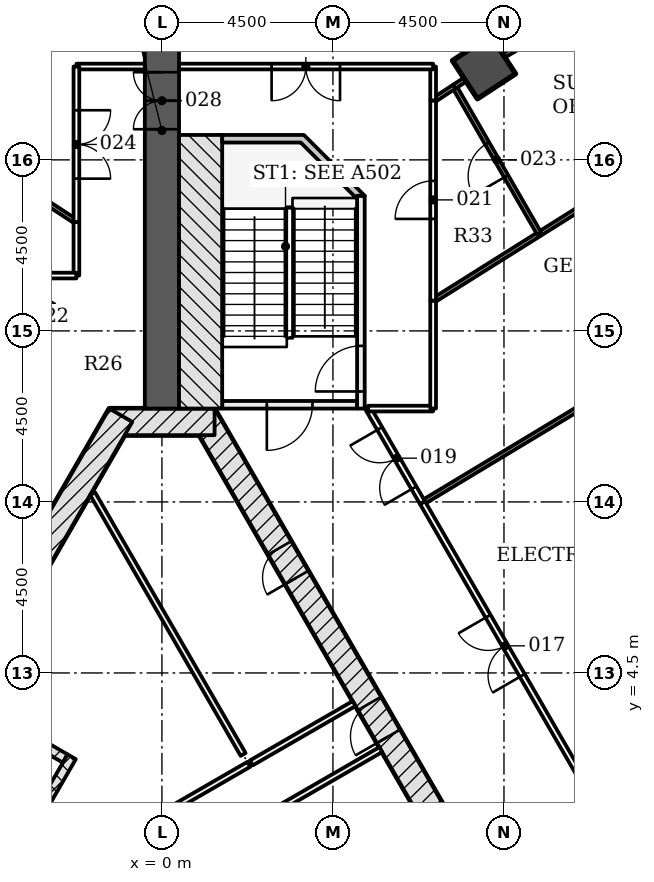
"""IFC4 building model, lengths in metres.
Left out: names, types, materials, properties, quantities, classifications, styles, units other than length and angle.
Written with IfcOpenShell. Run it as: python <this file> out.ifc"""

import sys

from ifc_helpers import new_model, si_unit, direction, frame, frame_2d, origin, origin_2d, place, context, subcontext, project, spatial, polyline, rectangle, outline, extrude, element, fill, save


model = new_model("IFC4")
c1 = context("Model", 3, precision=1e-05, world=origin(), true_north=direction((0.0, 1.0)))
c2 = subcontext(c1, "Body", "Model", "MODEL_VIEW")
j1 = project(units=[si_unit("LENGTHUNIT", "METRE"), si_unit("PLANEANGLEUNIT", "RADIAN")], contexts=[c1])
p1 = place(None, origin())
s1 = spatial("IfcSite", under=j1, at=p1, CompositionType="ELEMENT")
p2 = place(p1, origin())
s2 = spatial("IfcBuilding", under=s1, at=p2, CompositionType="ELEMENT")
p3 = place(p2, frame((0.0, 0.0, -9.0)))
s3 = spatial("IfcBuildingStorey", under=s2, at=p3, CompositionType="ELEMENT", Elevation=-9.0)
p4 = place(p3, frame((8.475, 20.438, -0.3), z_axis=(0.0, 0.0, 1.0), x_axis=(0.836867705394, 0.547405191489, 0.0)))
e1 = element("IfcColumn", 1, at=p4, inside=s3, PredefinedType="COLUMN", context=c2, shape_type="SweptSolid", body=[
    extrude(rectangle(XDim=1.2, YDim=1.2, at=origin_2d()), origin(), (0.0, 0.0, 1.0), 4.5),
])
p5 = place(p3, frame((10.311, -4.703, -0.3), z_axis=(0.0, 0.0, 1.0), x_axis=(-0.500001446645, 0.866024568562, 0.0)))
e2 = element("IfcWall", 2, at=p5, inside=s3, PredefinedType="SHEAR", context=c2, shape_type="SweptSolid", body=[
    extrude(rectangle(XDim=18.458, YDim=0.7, at=frame_2d((9.229, 0.0))), origin(), (0.0, 0.0, 1.0), 4.5),
])
p6 = place(p5, frame((8.7, 0.0, 0.3)))
e3 = element("IfcOpeningElement", 3, at=p6, cuts=e2, PredefinedType="OPENING", context=c2, shape_type="SweptSolid", body=[
    extrude(rectangle(XDim=1.0, YDim=2.1, at=frame_2d((0.5, 1.05))), frame((0.0, 0.36, 0.0), z_axis=(0.0, -1.0, 0.0), x_axis=(1.0, 0.0, 0.0)), (0.0, 0.0, 1.0), 0.72),
])
p7 = place(p5, frame((4.002, 0.0, 0.3)))
e4 = element("IfcOpeningElement", 4, at=p7, cuts=e2, PredefinedType="OPENING", context=c2, shape_type="SweptSolid", body=[
    extrude(rectangle(XDim=0.9, YDim=2.1, at=frame_2d((0.45, 1.05))), frame((0.0, 0.36, 0.0), z_axis=(0.0, -1.0, 0.0), x_axis=(1.0, 0.0, 0.0)), (0.0, 0.0, 1.0), 0.72),
])
p8 = place(p5, frame((13.527, 0.0, 0.3)))
e5 = element("IfcOpeningElement", 5, at=p8, cuts=e2, PredefinedType="OPENING", context=c2, shape_type="SweptSolid", body=[
    extrude(rectangle(XDim=0.9, YDim=2.1, at=frame_2d((0.45, 1.05))), frame((0.0, 0.36, 0.0), z_axis=(0.0, -1.0, 0.0), x_axis=(1.0, 0.0, 0.0)), (0.0, 0.0, 1.0), 0.72),
])
p9 = place(p3, frame((1.386, 11.106, -0.3), z_axis=(0.0, 0.0, 1.0), x_axis=(-1.0, 0.0, 0.0)))
e6 = element("IfcWall", 6, at=p9, inside=s3, PredefinedType="SHEAR", context=c2, shape_type="SweptSolid", body=[
    extrude(rectangle(XDim=2.771, YDim=0.7, at=frame_2d((1.386, 0.0))), origin(), (0.0, 0.0, 1.0), 4.5),
])
p10 = place(p3, frame((-1.083, 11.281, -0.3), z_axis=(0.0, 0.0, 1.0), x_axis=(-0.500001446645, -0.866024568562, 0.0)))
e7 = element("IfcWall", 7, at=p10, inside=s3, PredefinedType="SHEAR", context=c2, shape_type="SweptSolid", body=[
    extrude(rectangle(XDim=18.458, YDim=0.7, at=frame_2d((9.229, 0.0))), origin(), (0.0, 0.0, 1.0), 4.5),
])
p11 = place(p10, frame((8.979, 0.0, 0.3)))
e8 = element("IfcOpeningElement", 8, at=p11, cuts=e7, PredefinedType="OPENING", context=c2, shape_type="SweptSolid", body=[
    extrude(rectangle(XDim=1.2, YDim=2.1, at=frame_2d((0.6, 1.05))), frame((0.0, 0.36, 0.0), z_axis=(0.0, -1.0, 0.0), x_axis=(1.0, 0.0, 0.0)), (0.0, 0.0, 1.0), 0.72),
])
p12 = place(p10, frame((11.029, 0.0, 0.3)))
e9 = element("IfcOpeningElement", 9, at=p12, cuts=e7, PredefinedType="OPENING", context=c2, shape_type="SweptSolid", body=[
    extrude(rectangle(XDim=1.2, YDim=2.1, at=frame_2d((0.6, 1.05))), frame((0.0, 0.36, 0.0), z_axis=(0.0, -1.0, 0.0), x_axis=(1.0, 0.0, 0.0)), (0.0, 0.0, 1.0), 0.72),
])
p13 = place(p3, frame((0.0, 11.456, -0.3), z_axis=(0.0, 0.0, 1.0), x_axis=(0.0, 1.0, 0.0)))
e10 = element("IfcWall", 10, at=p13, inside=s3, PredefinedType="SHEAR", context=c2, shape_type="SweptSolid", body=[
    extrude(rectangle(XDim=14.633, YDim=0.9, at=frame_2d((7.316, 0.0))), origin(), (0.0, 0.0, 1.0), 4.5),
])
p14 = place(p13, frame((7.35, 0.0, 0.3)))
e11 = element("IfcOpeningElement", 11, at=p14, cuts=e10, PredefinedType="OPENING", context=c2, shape_type="SweptSolid", body=[
    extrude(rectangle(XDim=1.5, YDim=2.1, at=frame_2d((0.75, 1.05))), frame((0.0, 0.46, 0.0), z_axis=(0.0, -1.0, 0.0), x_axis=(1.0, 0.0, 0.0)), (0.0, 0.0, 1.0), 0.92),
])
p15 = place(p3, frame((-5.056, 3.699, 0.0), z_axis=(0.0, 0.0, 1.0), x_axis=(0.866032775405, -0.499987231761, 0.0)))
e12 = element("IfcWall", 12, at=p15, inside=s3, PredefinedType="PARTITIONING", context=c2, shape_type="SweptSolid", body=[
    extrude(rectangle(XDim=2.9, YDim=0.25, at=frame_2d((1.45, 0.0))), origin(), (0.0, 0.0, 1.0), 4.2),
])
p16 = place(p3, frame((-2.374, 2.294, 0.0), z_axis=(0.0, 0.0, 1.0), x_axis=(-0.499996127374, -0.866027639635, 0.0)))
e13 = element("IfcWall", 13, at=p16, inside=s3, PredefinedType="PARTITIONING", context=c2, shape_type="SweptSolid", body=[
    extrude(rectangle(XDim=4.35, YDim=0.25, at=frame_2d((2.175, 0.0))), origin(), (0.0, 0.0, 1.0), 4.2),
])
p17 = place(p3, frame((-9.651, -4.797, 0.0), z_axis=(0.0, 0.0, 1.0), x_axis=(0.866023073213, 0.500004036646, 0.0)))
e14 = element("IfcWall", 14, at=p17, inside=s3, PredefinedType="PARTITIONING", context=c2, shape_type="SweptSolid", body=[
    extrude(rectangle(XDim=13.785, YDim=0.15, at=frame_2d((6.892, 0.0))), origin(), (0.0, 0.0, 1.0), 4.2),
])
p18 = place(p17, frame((7.934, 0.0, 0.0)))
e15 = element("IfcOpeningElement", 15, at=p18, cuts=e14, PredefinedType="OPENING", context=c2, shape_type="SweptSolid", body=[
    extrude(rectangle(XDim=0.9, YDim=2.1, at=frame_2d((0.45, 1.05))), frame((0.0, 0.085, 0.0), z_axis=(0.0, -1.0, 0.0), x_axis=(1.0, 0.0, 0.0)), (0.0, 0.0, 1.0), 0.17),
])
p19 = place(p3, frame((-6.366, -4.517, 0.0), z_axis=(0.0, 0.0, 1.0), x_axis=(0.866023831006, 0.500002724122, 0.0)))
e16 = element("IfcWall", 16, at=p19, inside=s3, PredefinedType="PARTITIONING", context=c2, shape_type="SweptSolid", body=[
    extrude(rectangle(XDim=14.0, YDim=0.15, at=frame_2d((7.0, 0.0))), origin(), (0.0, 0.0, 1.0), 4.2),
])
p20 = place(p19, frame((4.951, 0.0, 0.0)))
e17 = element("IfcOpeningElement", 17, at=p20, cuts=e16, PredefinedType="OPENING", context=c2, shape_type="SweptSolid", body=[
    extrude(rectangle(XDim=0.9, YDim=2.1, at=frame_2d((0.45, 1.05))), frame((0.0, 0.085, 0.0), z_axis=(0.0, -1.0, 0.0), x_axis=(1.0, 0.0, 0.0)), (0.0, 0.0, 1.0), 0.17),
])
p21 = place(p3, frame((2.137, 2.355, 0.0), z_axis=(0.0, 0.0, 1.0), x_axis=(-0.500009612796, 0.866019853763, 0.0)))
e18 = element("IfcWall", 18, at=p21, inside=s3, PredefinedType="PARTITIONING", context=c2, shape_type="SweptSolid", body=[
    extrude(rectangle(XDim=7.924, YDim=0.15, at=frame_2d((3.962, 0.0))), origin(), (0.0, 0.0, 1.0), 4.2),
])
p22 = place(p3, frame((2.352, 2.133, 0.0), z_axis=(0.0, 0.0, 1.0), x_axis=(0.866042488821, 0.49997040668, 0.0)))
e19 = element("IfcWall", 19, at=p22, inside=s3, PredefinedType="PARTITIONING", context=c2, shape_type="SweptSolid", body=[
    extrude(rectangle(XDim=3.125, YDim=0.15, at=frame_2d((1.562, 0.0))), origin(), (0.0, 0.0, 1.0), 4.2),
])
p23 = place(p3, frame((5.135, 11.556, -0.3), z_axis=(0.0, 0.0, 1.0), x_axis=(-1.0, 0.0, 0.0)))
e20 = element("IfcWall", 20, at=p23, inside=s3, PredefinedType="SHEAR", context=c2, shape_type="SweptSolid", body=[
    extrude(rectangle(XDim=3.55, YDim=0.2, at=frame_2d((1.775, 0.0))), origin(), (0.0, 0.0, 1.0), 4.5),
])
p24 = place(p23, frame((1.175, 0.0, 0.3)))
e21 = element("IfcOpeningElement", 21, at=p24, cuts=e20, PredefinedType="OPENING", context=c2, shape_type="SweptSolid", body=[
    extrude(rectangle(XDim=1.2, YDim=2.1, at=frame_2d((0.6, 1.05))), frame((0.0, 0.11, 0.0), z_axis=(0.0, -1.0, 0.0), x_axis=(1.0, 0.0, 0.0)), (0.0, 0.0, 1.0), 0.22),
])
p25 = place(p3, frame((5.236, 11.456, -0.3), z_axis=(0.0, 0.0, 1.0), x_axis=(0.0, 1.0, 0.0)))
e22 = element("IfcWall", 22, at=p25, inside=s3, PredefinedType="SHEAR", context=c2, shape_type="SweptSolid", body=[
    extrude(rectangle(XDim=5.6, YDim=0.2, at=frame_2d((2.8, 0.0))), origin(), (0.0, 0.0, 1.0), 4.5),
])
p26 = place(p25, frame((0.45, 0.0, 0.3)))
e23 = element("IfcOpeningElement", 23, at=p26, cuts=e22, PredefinedType="OPENING", context=c2, shape_type="SweptSolid", body=[
    extrude(rectangle(XDim=1.2, YDim=2.1, at=frame_2d((0.6, 1.05))), frame((0.0, 0.11, 0.0), z_axis=(0.0, -1.0, 0.0), x_axis=(1.0, 0.0, 0.0)), (0.0, 0.0, 1.0), 0.22),
])
p27 = place(p3, frame((1.018, 11.456, -0.3), z_axis=(0.0, 0.0, 1.0), x_axis=(0.0, 1.0, 0.0)))
e24 = element("IfcWall", 24, at=p27, inside=s3, PredefinedType="SHEAR", context=c2, shape_type="SweptSolid", body=[
    extrude(rectangle(XDim=7.2, YDim=1.136, at=frame_2d((3.6, 0.0))), origin(), (0.0, 0.0, 1.0), 4.5),
])
p28 = place(p3, frame((0.0, 0.0, -0.3)))
e25 = element("IfcWall", 25, at=p28, inside=s3, PredefinedType="SHEAR", context=c2, shape_type="SweptSolid", body=[
    extrude(outline(polyline([(5.336, 17.056), (3.736, 18.656), (1.586, 18.656), (1.586, 18.456), (3.653, 18.456), (5.135, 16.974), (5.135, 17.056), (5.135, 17.056), (5.135, 17.056), (5.135, 17.056), (5.135, 17.056), (5.135, 17.056), (5.135, 17.056), (5.135, 17.056), (5.135, 17.056), (5.135, 17.056), (5.135, 17.056), (5.135, 17.056), (5.135, 17.056), (5.135, 17.056), (5.135, 17.056), (5.135, 17.056), (5.135, 17.056), (5.336, 17.056)])), origin(), (0.0, 0.0, 1.0), 4.5),
])
p29 = place(p3, frame((11.206, 1.446, 0.0), z_axis=(0.0, 0.0, 1.0), x_axis=(-0.499983976786, 0.866034654594, 0.0)))
e26 = element("IfcWall", 26, at=p29, inside=s3, PredefinedType="PARTITIONING", context=c2, shape_type="SweptSolid", body=[
    extrude(rectangle(XDim=8.7, YDim=0.15, at=frame_2d((4.35, 0.0))), origin(), (0.0, 0.0, 1.0), 3.588),
])
p30 = place(p29, frame((3.45, 0.0, 0.0)))
e27 = element("IfcOpeningElement", 27, at=p30, cuts=e26, PredefinedType="OPENING", context=c2, shape_type="SweptSolid", body=[
    extrude(rectangle(XDim=1.8, YDim=2.1, at=frame_2d((0.9, 1.05))), frame((0.0, 0.085, 0.0), z_axis=(0.0, -1.0, 0.0), x_axis=(1.0, 0.0, 0.0)), (0.0, 0.0, 1.0), 0.17),
])
p31 = place(p3, frame((6.855, 8.982, 0.0), z_axis=(0.0, 0.0, 1.0), x_axis=(-0.500176439337, 0.865923512519, 0.0)))
e28 = element("IfcWall", 28, at=p31, inside=s3, PredefinedType="PARTITIONING", context=c2, shape_type="SweptSolid", body=[
    extrude(rectangle(XDim=2.855, YDim=0.15, at=frame_2d((1.427, 0.0))), origin(), (0.0, 0.0, 1.0), 3.588),
])
p32 = place(p31, frame((0.45, 0.0, 0.0)))
e29 = element("IfcOpeningElement", 29, at=p32, cuts=e28, PredefinedType="OPENING", context=c2, shape_type="SweptSolid", body=[
    extrude(rectangle(XDim=1.8, YDim=2.1, at=frame_2d((0.9, 1.05))), frame((0.0, 0.085, 0.0), z_axis=(0.0, -1.0, 0.0), x_axis=(1.0, 0.0, 0.0)), (0.0, 0.0, 1.0), 0.17),
])
p33 = place(p3, frame((5.427, 11.456, 0.0), z_axis=(0.0, 0.0, 1.0), x_axis=(1.0, 0.0, 0.0)))
e30 = element("IfcWall", 30, at=p33, inside=s3, PredefinedType="PARTITIONING", context=c2, shape_type="SweptSolid", body=[
    extrude(rectangle(XDim=1.708, YDim=0.15, at=frame_2d((0.854, 0.0))), origin(), (0.0, 0.0, 1.0), 4.2),
])
p34 = place(p3, frame((7.136, 11.457, 0.0), z_axis=(0.0, 0.0, 1.0), x_axis=(0.0, 1.0, 0.0)))
e31 = element("IfcWall", 31, at=p34, inside=s3, PredefinedType="PARTITIONING", context=c2, shape_type="SweptSolid", body=[
    extrude(rectangle(XDim=2.839, YDim=0.15, at=frame_2d((1.419, 0.0))), origin(), (0.0, 0.0, 1.0), 3.588),
])
p35 = place(p3, frame((7.136, 14.297, 0.0), z_axis=(0.0, 0.0, 1.0), x_axis=(0.0, 1.0, 0.0)))
e32 = element("IfcWall", 32, at=p35, inside=s3, PredefinedType="PARTITIONING", context=c2, shape_type="SweptSolid", body=[
    extrude(rectangle(XDim=5.266, YDim=0.15, at=frame_2d((2.633, 0.0))), origin(), (0.0, 0.0, 1.0), 3.588),
])
p36 = place(p35, frame((2.15, 0.0, 0.0)))
e33 = element("IfcOpeningElement", 33, at=p36, cuts=e32, PredefinedType="OPENING", context=c2, shape_type="SweptSolid", body=[
    extrude(rectangle(XDim=1.0, YDim=2.1, at=frame_2d((0.5, 1.05))), frame((0.0, 0.085, 0.0), z_axis=(0.0, -1.0, 0.0), x_axis=(1.0, 0.0, 0.0)), (0.0, 0.0, 1.0), 0.17),
])
p37 = place(p3, frame((7.136, 19.563, 0.0), z_axis=(0.0, 0.0, 1.0), x_axis=(0.0, 1.0, 0.0)))
e34 = element("IfcWall", 34, at=p37, inside=s3, PredefinedType="PARTITIONING", context=c2, shape_type="SweptSolid", body=[
    extrude(rectangle(XDim=0.893, YDim=0.15, at=frame_2d((0.447, 0.0))), origin(), (0.0, 0.0, 1.0), 3.588),
])
p38 = place(p3, frame((7.136, 20.456, 0.0), z_axis=(0.0, 0.0, 1.0), x_axis=(-1.0, 0.0, 0.0)))
e35 = element("IfcWall", 35, at=p38, inside=s3, PredefinedType="PARTITIONING", context=c2, shape_type="SweptSolid", body=[
    extrude(rectangle(XDim=6.686, YDim=0.15, at=frame_2d((3.343, 0.0))), origin(), (0.0, 0.0, 1.0), 3.588),
])
p39 = place(p38, frame((2.45, 0.0, 0.0)))
e36 = element("IfcOpeningElement", 36, at=p39, cuts=e35, PredefinedType="OPENING", context=c2, shape_type="SweptSolid", body=[
    extrude(rectangle(XDim=1.8, YDim=2.1, at=frame_2d((0.9, 1.05))), frame((0.0, 0.085, 0.0), z_axis=(0.0, -1.0, 0.0), x_axis=(1.0, 0.0, 0.0)), (0.0, 0.0, 1.0), 0.17),
])
p40 = place(p3, frame((12.736, 12.524, 0.0), z_axis=(0.0, 0.0, 1.0), x_axis=(-0.856559377083, -0.516048479827, 0.0)))
e37 = element("IfcWall", 37, at=p40, inside=s3, PredefinedType="PARTITIONING", context=c2, shape_type="SweptSolid", body=[
    extrude(rectangle(XDim=6.864, YDim=0.12, at=frame_2d((3.432, 0.0))), origin(), (0.0, 0.0, 1.0), 3.588),
])
p41 = place(p3, frame((-2.25, 16.367, 0.0), z_axis=(0.0, 0.0, 1.0), x_axis=(0.0, -1.0, 0.0)))
e38 = element("IfcWall", 38, at=p41, inside=s3, PredefinedType="PARTITIONING", context=c2, shape_type="SweptSolid", body=[
    extrude(rectangle(XDim=1.411, YDim=0.15, at=frame_2d((0.706, 0.0))), origin(), (0.0, 0.0, 1.0), 3.588),
])
p42 = place(p3, frame((-2.25, 14.956, 0.0), z_axis=(0.0, 0.0, 1.0), x_axis=(-1.0, 0.0, 0.0)))
e39 = element("IfcWall", 39, at=p42, inside=s3, PredefinedType="PARTITIONING", context=c2, shape_type="SweptSolid", body=[
    extrude(rectangle(XDim=1.156, YDim=0.15, at=frame_2d((0.578, 0.0))), origin(), (0.0, 0.0, 1.0), 4.2),
])
p43 = place(p3, frame((-0.45, 20.456, 0.0), z_axis=(0.0, 0.0, 1.0), x_axis=(-1.0, 0.0, 0.0)))
e40 = element("IfcWall", 40, at=p43, inside=s3, PredefinedType="PARTITIONING", context=c2, shape_type="SweptSolid", body=[
    extrude(rectangle(XDim=1.8, YDim=0.15, at=frame_2d((0.9, 0.0))), origin(), (0.0, 0.0, 1.0), 3.588),
])
p44 = place(p3, frame((-2.25, 20.456, 0.0), z_axis=(0.0, 0.0, 1.0), x_axis=(0.0, -1.0, 0.0)))
e41 = element("IfcWall", 41, at=p44, inside=s3, PredefinedType="PARTITIONING", context=c2, shape_type="SweptSolid", body=[
    extrude(rectangle(XDim=4.089, YDim=0.15, at=frame_2d((2.044, 0.0))), origin(), (0.0, 0.0, 1.0), 3.588),
])
p45 = place(p44, frame((1.15, 0.0, 0.0)))
e42 = element("IfcOpeningElement", 42, at=p45, cuts=e41, PredefinedType="OPENING", context=c2, shape_type="SweptSolid", body=[
    extrude(rectangle(XDim=1.8, YDim=2.1, at=frame_2d((0.9, 1.05))), frame((0.0, 0.085, 0.0), z_axis=(0.0, -1.0, 0.0), x_axis=(1.0, 0.0, 0.0)), (0.0, 0.0, 1.0), 0.17),
])
p46 = place(p3, frame((9.932, 16.051, 0.0), z_axis=(0.0, 0.0, 1.0), x_axis=(-0.846948891592, -0.531674312932, 0.0)))
e43 = element("IfcWall", 43, at=p46, inside=s3, PredefinedType="PARTITIONING", context=c2, shape_type="SweptSolid", body=[
    extrude(rectangle(XDim=3.299, YDim=0.12, at=frame_2d((1.649, 0.0))), origin(), (0.0, 0.0, 1.0), 3.588),
])
p47 = place(p3, frame((10.898, 16.658, 0.0), z_axis=(0.0, 0.0, 1.0), x_axis=(-0.846984344306, -0.531617833128, 0.0)))
e44 = element("IfcWall", 44, at=p47, inside=s3, PredefinedType="PARTITIONING", context=c2, shape_type="SweptSolid", body=[
    extrude(rectangle(XDim=1.138, YDim=0.12, at=frame_2d((0.569, 0.0))), origin(), (0.0, 0.0, 1.0), 3.588),
])
p48 = place(p3, frame((9.932, 16.053, 0.0), z_axis=(0.0, 0.0, 1.0), x_axis=(-0.499861052408, 0.866105610353, 0.0)))
e45 = element("IfcWall", 45, at=p48, inside=s3, PredefinedType="PARTITIONING", context=c2, shape_type="SweptSolid", body=[
    extrude(rectangle(XDim=4.473, YDim=0.12, at=frame_2d((2.236, 0.0))), origin(), (0.0, 0.0, 1.0), 3.588),
])
p49 = place(p48, frame((1.75, 0.0, 0.0)))
e46 = element("IfcOpeningElement", 46, at=p49, cuts=e45, PredefinedType="OPENING", context=c2, shape_type="SweptSolid", body=[
    extrude(rectangle(XDim=1.0, YDim=2.1, at=frame_2d((0.5, 1.05))), frame((0.0, 0.07, 0.0), z_axis=(0.0, -1.0, 0.0), x_axis=(1.0, 0.0, 0.0)), (0.0, 0.0, 1.0), 0.14),
])
p50 = place(p3, frame((7.698, 19.929, 0.0), z_axis=(0.0, 0.0, 1.0), x_axis=(-0.837123867648, -0.547013372975, 0.0)))
e47 = element("IfcWall", 47, at=p50, inside=s3, PredefinedType="PARTITIONING", context=c2, shape_type="SweptSolid", body=[
    extrude(rectangle(XDim=0.669, YDim=0.12, at=frame_2d((0.334, 0.0))), origin(), (0.0, 0.0, 1.0), 3.588),
])
p51 = place(p3, frame((-2.252, 16.367, 0.0), z_axis=(0.0, 0.0, 1.0), x_axis=(-0.83688089218, 0.547385031129, 0.0)))
e48 = element("IfcWall", 48, at=p51, inside=s3, PredefinedType="PARTITIONING", context=c2, shape_type="SweptSolid", body=[
    extrude(rectangle(XDim=6.836, YDim=0.12, at=frame_2d((3.418, 0.0))), origin(), (0.0, 0.0, 1.0), 3.588),
])
p52 = place(p3, frame((7.973, 20.109, 0.0), z_axis=(0.0, 0.0, 1.0), x_axis=(-0.838160669165, -0.545423406781, 0.0)))
e49 = element("IfcWall", 49, at=p52, inside=s3, PredefinedType="PARTITIONING", context=c2, shape_type="SweptSolid", body=[
    extrude(rectangle(XDim=0.335, YDim=0.12, at=frame_2d((0.167, 0.0))), origin(), (0.0, 0.0, 1.0), 3.588),
])
p53 = place(p3, frame((13.599, 23.459, 0.0), z_axis=(0.0, 0.0, 1.0), x_axis=(-0.861446814084, -0.507847798563, 0.0)))
e50 = element("IfcWall", 50, at=p53, inside=s3, PredefinedType="PARTITIONING", context=c2, shape_type="SweptSolid", body=[
    extrude(rectangle(XDim=5.348, YDim=0.12, at=frame_2d((2.674, 0.0))), origin(), (0.0, 0.0, 1.0), 3.583),
])
p54 = place(p6, origin())
e51 = element("IfcDoor", 51, at=p54, inside=s3, OperationType="SINGLE_SWING_LEFT", PredefinedType="DOOR", context=c2, shape_type="SweptSolid", body=[
    extrude(rectangle(XDim=1.0, YDim=2.1, at=frame_2d((0.5, 1.05))), frame((0.0, 0.075, 0.0), z_axis=(0.0, -1.0, 0.0), x_axis=(1.0, 0.0, 0.0)), (0.0, 0.0, 1.0), 0.15),
])
fill(e3, e51)
p55 = place(p8, origin())
e52 = element("IfcDoor", 52, at=p55, inside=s3, OperationType="SINGLE_SWING_LEFT", PredefinedType="DOOR", context=c2, shape_type="SweptSolid", body=[
    extrude(rectangle(XDim=0.9, YDim=2.1, at=frame_2d((0.45, 1.05))), frame((0.0, 0.075, 0.0), z_axis=(0.0, -1.0, 0.0), x_axis=(1.0, 0.0, 0.0)), (0.0, 0.0, 1.0), 0.15),
])
fill(e5, e52)
p56 = place(p24, origin())
e53 = element("IfcDoor", 53, at=p56, inside=s3, OperationType="SINGLE_SWING_RIGHT", PredefinedType="DOOR", context=c2, shape_type="SweptSolid", body=[
    extrude(rectangle(XDim=1.2, YDim=2.1, at=frame_2d((0.6, 1.05))), frame((0.0, 0.025, 0.0), z_axis=(0.0, -1.0, 0.0), x_axis=(1.0, 0.0, 0.0)), (0.0, 0.0, 1.0), 0.05),
])
fill(e21, e53)
p57 = place(p26, origin())
e54 = element("IfcDoor", 54, at=p57, inside=s3, OperationType="SINGLE_SWING_LEFT", PredefinedType="DOOR", context=c2, shape_type="SweptSolid", body=[
    extrude(rectangle(XDim=1.2, YDim=2.1, at=frame_2d((0.6, 1.05))), frame((0.0, 0.025, 0.0), z_axis=(0.0, -1.0, 0.0), x_axis=(1.0, 0.0, 0.0)), (0.0, 0.0, 1.0), 0.05),
])
fill(e23, e54)
p58 = place(p30, origin())
e55 = element("IfcDoor", 55, at=p58, inside=s3, OperationType="DOUBLE_DOOR_SINGLE_SWING", PredefinedType="DOOR", context=c2, shape_type="SweptSolid", body=[
    extrude(rectangle(XDim=1.8, YDim=2.1, at=frame_2d((0.9, 1.05))), frame((0.0, 0.025, 0.0), z_axis=(0.0, -1.0, 0.0), x_axis=(1.0, 0.0, 0.0)), (0.0, 0.0, 1.0), 0.05),
])
fill(e27, e55)
p59 = place(p32, origin())
e56 = element("IfcDoor", 56, at=p59, inside=s3, OperationType="DOUBLE_DOOR_SINGLE_SWING", PredefinedType="DOOR", context=c2, shape_type="SweptSolid", body=[
    extrude(rectangle(XDim=1.8, YDim=2.1, at=frame_2d((0.9, 1.05))), frame((0.0, 0.025, 0.0), z_axis=(0.0, -1.0, 0.0), x_axis=(1.0, 0.0, 0.0)), (0.0, 0.0, 1.0), 0.05),
])
fill(e29, e56)
p60 = place(p36, origin())
e57 = element("IfcDoor", 57, at=p60, inside=s3, OperationType="SINGLE_SWING_LEFT", PredefinedType="DOOR", context=c2, shape_type="SweptSolid", body=[
    extrude(rectangle(XDim=1.0, YDim=2.1, at=frame_2d((0.5, 1.05))), frame((0.0, 0.025, 0.0), z_axis=(0.0, -1.0, 0.0), x_axis=(1.0, 0.0, 0.0)), (0.0, 0.0, 1.0), 0.05),
])
fill(e33, e57)
p61 = place(p49, origin())
e58 = element("IfcDoor", 58, at=p61, inside=s3, OperationType="SINGLE_SWING_LEFT", PredefinedType="DOOR", context=c2, shape_type="SweptSolid", body=[
    extrude(rectangle(XDim=1.0, YDim=2.1, at=frame_2d((0.5, 1.05))), frame((0.0, 0.025, 0.0), z_axis=(0.0, -1.0, 0.0), x_axis=(1.0, 0.0, 0.0)), (0.0, 0.0, 1.0), 0.05),
])
fill(e46, e58)
p62 = place(p45, origin())
e59 = element("IfcDoor", 59, at=p62, inside=s3, OperationType="DOUBLE_DOOR_SINGLE_SWING", PredefinedType="DOOR", context=c2, shape_type="SweptSolid", body=[
    extrude(rectangle(XDim=1.8, YDim=2.1, at=frame_2d((0.9, 1.05))), frame((0.0, 0.025, 0.0), z_axis=(0.0, -1.0, 0.0), x_axis=(1.0, 0.0, 0.0)), (0.0, 0.0, 1.0), 0.05),
])
fill(e42, e59)
p63 = place(p39, origin())
e60 = element("IfcDoor", 60, at=p63, inside=s3, OperationType="DOUBLE_DOOR_SINGLE_SWING", PredefinedType="DOOR", context=c2, shape_type="SweptSolid", body=[
    extrude(rectangle(XDim=1.8, YDim=2.1, at=frame_2d((0.9, 1.05))), frame((0.0, 0.025, 0.0), z_axis=(0.0, -1.0, 0.0), x_axis=(1.0, 0.0, 0.0)), (0.0, 0.0, 1.0), 0.05),
])
fill(e36, e60)
p64 = place(p14, origin())
e61 = element("IfcDoor", 61, at=p64, inside=s3, OperationType="DOUBLE_DOOR_SINGLE_SWING", PredefinedType="DOOR", context=c2, shape_type="SweptSolid", body=[
    extrude(rectangle(XDim=1.5, YDim=2.1, at=frame_2d((0.75, 1.05))), frame((0.0, 0.025, 0.0), z_axis=(0.0, -1.0, 0.0), x_axis=(1.0, 0.0, 0.0)), (0.0, 0.0, 1.0), 0.05),
])
fill(e11, e61)
save(model, sys.argv[1])
